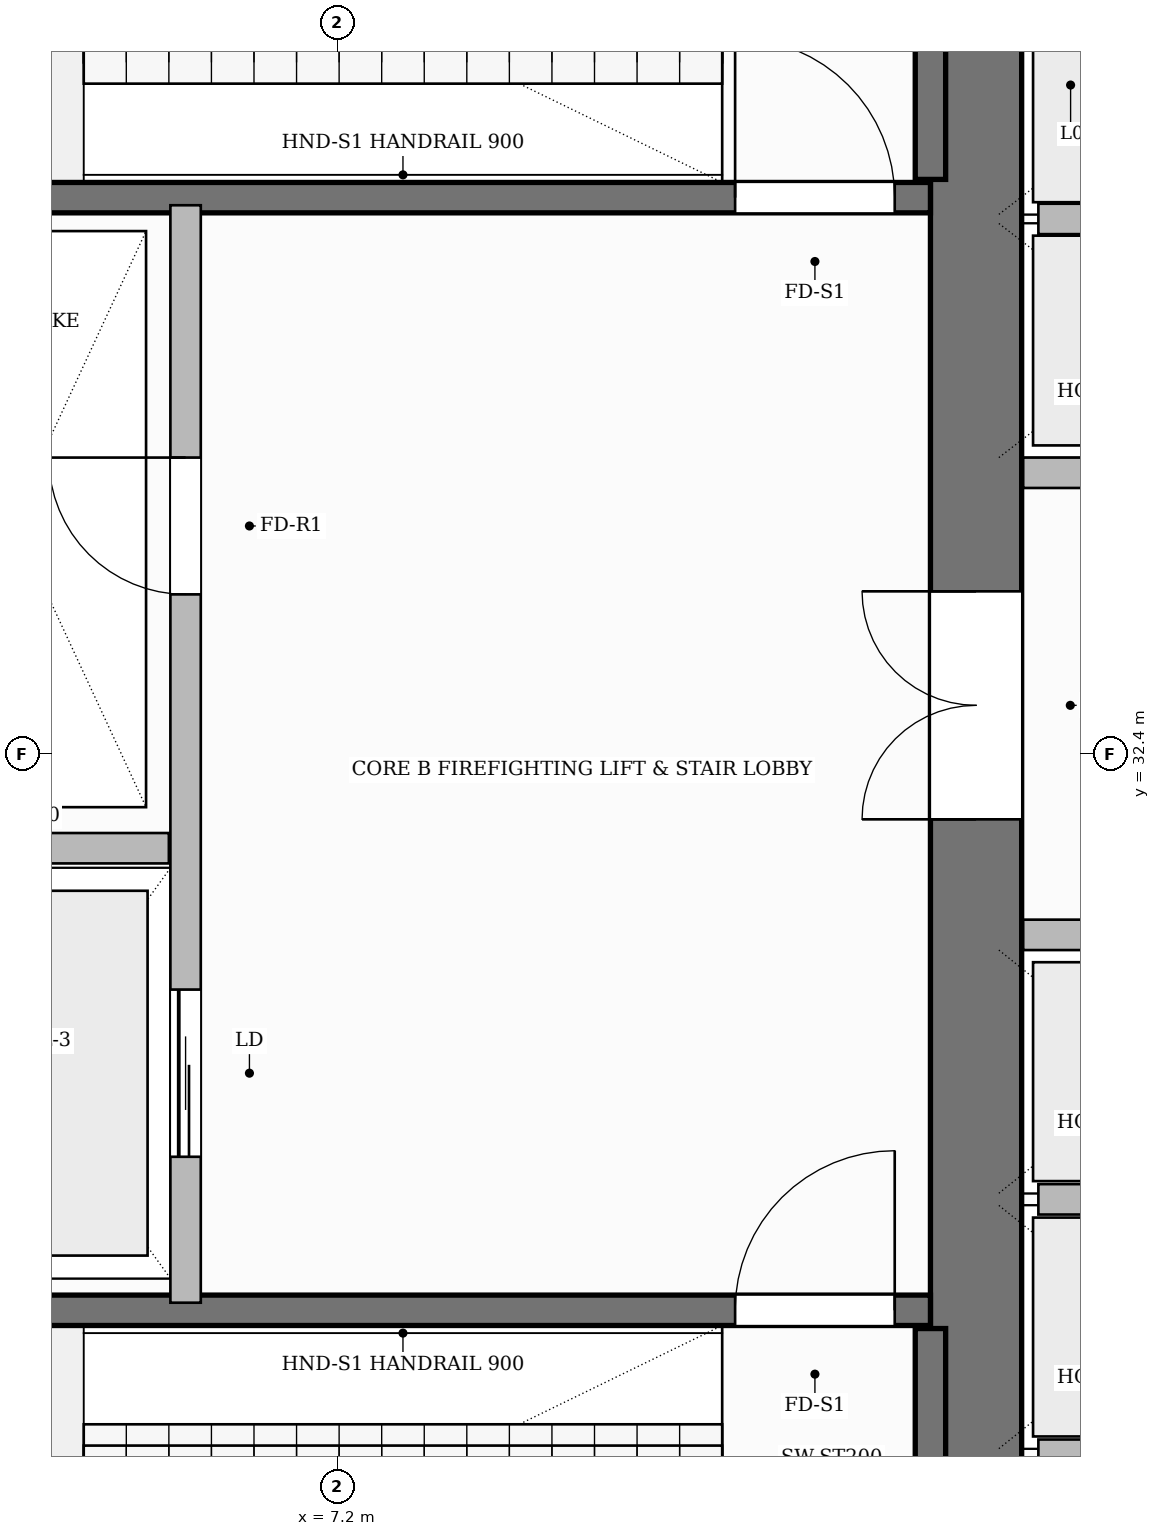
"""IFC4 building model, lengths in metres.
Left out: names, types, materials, properties, quantities, classifications, styles, units other than length and angle.
Written with IfcOpenShell. Run it as: python <this file> out.ifc"""

import sys

from ifc_helpers import new_model, si_unit, direction, frame, frame_2d, origin, place, context, subcontext, project, spatial, rectangle, extrude, source, transform, mapped, element, fill, save


model = new_model("IFC4")
c1 = context("Model", 3, precision=1e-05, world=origin(), true_north=direction((0.0, 1.0)))
c2 = subcontext(c1, "Body", "Model", "MODEL_VIEW")
j1 = project(units=[si_unit("LENGTHUNIT", "METRE"), si_unit("PLANEANGLEUNIT", "RADIAN")], contexts=[c1])
p1 = place(None, origin())
s1 = spatial("IfcSite", under=j1, at=p1, CompositionType="ELEMENT")
p2 = place(p1, origin())
s2 = spatial("IfcBuilding", under=s1, at=p2, CompositionType="ELEMENT")
p3 = place(p2, origin())
s3 = spatial("IfcBuildingStorey", under=s2, at=p3, CompositionType="ELEMENT", Elevation=0.0)
p4 = place(p3, frame((11.4, 25.5, 0.0), z_axis=(0.0, 0.0, 1.0), x_axis=(0.0, 1.0, 0.0)))
e1 = element("IfcWall", 1, at=p4, inside=s3, PredefinedType="SHEAR", context=c2, shape_type="SweptSolid", body=[
    extrude(rectangle(XDim=13.8, YDim=0.6, at=frame_2d((6.9, 0.0))), origin(), (0.0, 0.0, 1.0), 5.4),
])
p5 = place(p4, frame((6.47, 0.0, 0.0)))
e2 = element("IfcOpeningElement", 2, at=p5, cuts=e1, PredefinedType="OPENING", context=c2, shape_type="SweptSolid", body=[
    extrude(rectangle(XDim=1.5, YDim=2.2, at=frame_2d((0.75, 1.1))), frame((0.0, 0.31, 0.0), z_axis=(0.0, -1.0, 0.0), x_axis=(1.0, 0.0, 0.0)), (0.0, 0.0, 1.0), 0.62),
])
p6 = place(p3, frame((11.1, 25.92, 0.0), z_axis=(0.0, 0.0, 1.0), x_axis=(0.0, 1.0, 0.0)))
e3 = element("IfcWall", 3, at=p6, inside=s3, PredefinedType="SHEAR", context=c2, shape_type="SweptSolid", body=[
    extrude(rectangle(XDim=2.7, YDim=0.2, at=frame_2d((1.35, 0.0))), origin(), (0.0, 0.0, 1.0), 5.4),
])
p7 = place(p3, frame((4.0, 28.74, 0.0), z_axis=(0.0, 0.0, 1.0), x_axis=(1.0, 0.0, 0.0)))
e4 = element("IfcWall", 4, at=p7, inside=s3, PredefinedType="SHEAR", context=c2, shape_type="SweptSolid", body=[
    extrude(rectangle(XDim=7.1, YDim=0.2, at=frame_2d((3.55, 0.0))), origin(), (0.0, 0.0, 1.0), 5.4),
])
p8 = place(p7, frame((5.815, 0.0, 0.0)))
e5 = element("IfcOpeningElement", 5, at=p8, cuts=e4, PredefinedType="OPENING", context=c2, shape_type="SweptSolid", body=[
    extrude(rectangle(XDim=1.05, YDim=2.2, at=frame_2d((0.525, 1.1))), frame((0.0, 0.11, 0.0), z_axis=(0.0, -1.0, 0.0), x_axis=(1.0, 0.0, 0.0)), (0.0, 0.0, 1.0), 0.22),
])
p9 = place(p3, frame((11.1, 36.18, 0.0), z_axis=(0.0, 0.0, 1.0), x_axis=(0.0, 1.0, 0.0)))
e6 = element("IfcWall", 6, at=p9, inside=s3, PredefinedType="SHEAR", context=c2, shape_type="SweptSolid", body=[
    extrude(rectangle(XDim=2.7, YDim=0.2, at=frame_2d((1.35, 0.0))), origin(), (0.0, 0.0, 1.0), 5.4),
])
p10 = place(p3, frame((4.0, 36.06, 0.0), z_axis=(0.0, 0.0, 1.0), x_axis=(1.0, 0.0, 0.0)))
e7 = element("IfcWall", 7, at=p10, inside=s3, PredefinedType="SHEAR", context=c2, shape_type="SweptSolid", body=[
    extrude(rectangle(XDim=7.1, YDim=0.2, at=frame_2d((3.55, 0.0))), origin(), (0.0, 0.0, 1.0), 5.4),
])
p11 = place(p10, frame((5.815, 0.0, 0.0)))
e8 = element("IfcOpeningElement", 8, at=p11, cuts=e7, PredefinedType="OPENING", context=c2, shape_type="SweptSolid", body=[
    extrude(rectangle(XDim=1.05, YDim=2.2, at=frame_2d((0.525, 1.1))), frame((0.0, 0.11, 0.0), z_axis=(0.0, -1.0, 0.0), x_axis=(1.0, 0.0, 0.0)), (0.0, 0.0, 1.0), 0.22),
])
p12 = place(p3, frame((6.2, 28.79, 0.0), z_axis=(0.0, 0.0, 1.0), x_axis=(0.0, 1.0, 0.0)))
e9 = element("IfcWall", 9, at=p12, inside=s3, PredefinedType="PARTITIONING", context=c2, shape_type="SweptSolid", body=[
    extrude(rectangle(XDim=7.22, YDim=0.2, at=frame_2d((3.61, 0.0))), origin(), (0.0, 0.0, 1.0), 5.1),
])
p13 = place(p12, frame((4.66, 0.0, 0.0)))
e10 = element("IfcOpeningElement", 10, at=p13, cuts=e9, PredefinedType="OPENING", context=c2, shape_type="SweptSolid", body=[
    extrude(rectangle(XDim=0.9, YDim=2.1, at=frame_2d((0.45, 1.05))), frame((0.0, 0.11, 0.0), z_axis=(0.0, -1.0, 0.0), x_axis=(1.0, 0.0, 0.0)), (0.0, 0.0, 1.0), 0.22),
])
p14 = place(p12, frame((0.96, 0.0, 0.0)))
e11 = element("IfcOpeningElement", 11, at=p14, cuts=e9, PredefinedType="OPENING", context=c2, shape_type="SweptSolid", body=[
    extrude(rectangle(XDim=1.1, YDim=2.2, at=frame_2d((0.55, 1.1))), frame((0.0, 0.11, 0.0), z_axis=(0.0, -1.0, 0.0), x_axis=(1.0, 0.0, 0.0)), (0.0, 0.0, 1.0), 0.22),
])
p15 = place(p3, frame((3.96, 31.78, 0.0), z_axis=(0.0, 0.0, 1.0), x_axis=(1.0, 0.0, 0.0)))
e12 = element("IfcWall", 12, at=p15, inside=s3, PredefinedType="PARTITIONING", context=c2, shape_type="SweptSolid", body=[
    extrude(rectangle(XDim=2.13, YDim=0.2, at=frame_2d((1.065, 0.0))), origin(), (0.0, 0.0, 1.0), 5.1),
])
p16 = place(p3, frame((11.71, 31.21, 0.0), z_axis=(0.0, 0.0, 1.0), x_axis=(1.0, 0.0, 0.0)))
e13 = element("IfcWall", 13, at=p16, inside=s3, PredefinedType="PARTITIONING", context=c2, shape_type="SweptSolid", body=[
    extrude(rectangle(XDim=1.96, YDim=0.2, at=frame_2d((0.98, 0.0))), origin(), (0.0, 0.0, 1.0), 5.1),
])
for number, where, z_axis, x_axis in (
    (14, (11.81, 27.79, 0.0), (0.0, 0.0, 1.0), (1.0, 0.0, 0.0)),
    (15, (11.81, 29.47, 0.0), (0.0, 0.0, 1.0), (1.0, 0.0, 0.0)),
):
    element("IfcWall", number, at=place(p3, frame(where, z_axis=z_axis, x_axis=x_axis)), inside=s3, PredefinedType="PARTITIONING", context=c2, shape_type="SweptSolid", body=[
        extrude(rectangle(XDim=1.76, YDim=0.2, at=frame_2d((0.88, 0.0))), origin(), (0.0, 0.0, 1.0), 5.1),
    ])
p17 = place(p3, frame((11.71, 34.25, 0.0), z_axis=(0.0, 0.0, 1.0), x_axis=(1.0, 0.0, 0.0)))
e16 = element("IfcWall", 16, at=p17, inside=s3, PredefinedType="PARTITIONING", context=c2, shape_type="SweptSolid", body=[
    extrude(rectangle(XDim=1.96, YDim=0.2, at=frame_2d((0.98, 0.0))), origin(), (0.0, 0.0, 1.0), 5.1),
])
p18 = place(p3, frame((11.81, 35.92, 0.0), z_axis=(0.0, 0.0, 1.0), x_axis=(1.0, 0.0, 0.0)))
e17 = element("IfcWall", 17, at=p18, inside=s3, PredefinedType="PARTITIONING", context=c2, shape_type="SweptSolid", body=[
    extrude(rectangle(XDim=1.76, YDim=0.2, at=frame_2d((0.88, 0.0))), origin(), (0.0, 0.0, 1.0), 5.1),
])
m1 = source(origin(), c2, "Body", "SweptSolid", [
    extrude(rectangle(XDim=1.05, YDim=2.2, at=frame_2d((0.525, 1.1))), frame((0.0, 0.025, 0.0), z_axis=(0.0, -1.0, 0.0), x_axis=(1.0, 0.0, 0.0)), (0.0, 0.0, 1.0), 0.05),
])
p19 = place(p8, origin())
e18 = element("IfcDoor", 18, at=p19, inside=s3, OperationType="SINGLE_SWING_RIGHT", PredefinedType="DOOR", context=c2, shape_type="MappedRepresentation", body=[
    mapped(m1, transform((0.0, 0.0, 0.0), scale=1.0)),
])
fill(e5, e18)
p20 = place(p11, origin())
e19 = element("IfcDoor", 19, at=p20, inside=s3, OperationType="SINGLE_SWING_LEFT", PredefinedType="DOOR", context=c2, shape_type="MappedRepresentation", body=[
    mapped(m1, transform((0.0, 0.0, 0.0), scale=1.0)),
])
fill(e8, e19)
m2 = source(origin(), c2, "Body", "SweptSolid", [
    extrude(rectangle(XDim=0.9, YDim=2.1, at=frame_2d((0.45, 1.05))), frame((0.0, 0.025, 0.0), z_axis=(0.0, -1.0, 0.0), x_axis=(1.0, 0.0, 0.0)), (0.0, 0.0, 1.0), 0.05),
])
p21 = place(p13, origin())
e20 = element("IfcDoor", 20, at=p21, inside=s3, OperationType="SINGLE_SWING_RIGHT", PredefinedType="DOOR", context=c2, shape_type="MappedRepresentation", body=[
    mapped(m2, transform((0.0, 0.0, 0.0), scale=1.0)),
])
fill(e10, e20)
m3 = source(origin(), c2, "Body", "SweptSolid", [
    extrude(rectangle(XDim=1.5, YDim=2.2, at=frame_2d((0.75, 1.1))), frame((0.0, 0.025, 0.0), z_axis=(0.0, -1.0, 0.0), x_axis=(1.0, 0.0, 0.0)), (0.0, 0.0, 1.0), 0.05),
])
p22 = place(p5, origin())
e21 = element("IfcDoor", 21, at=p22, inside=s3, OperationType="DOUBLE_DOOR_SINGLE_SWING", PredefinedType="DOOR", context=c2, shape_type="MappedRepresentation", body=[
    mapped(m3, transform((0.0, 0.0, 0.0), scale=1.0)),
])
fill(e2, e21)
m4 = source(origin(), c2, "Body", "SweptSolid", [
    extrude(rectangle(XDim=1.1, YDim=2.2, at=frame_2d((0.55, 1.1))), frame((0.0, 0.025, 0.0), z_axis=(0.0, -1.0, 0.0), x_axis=(1.0, 0.0, 0.0)), (0.0, 0.0, 1.0), 0.05),
])
p23 = place(p14, origin())
e22 = element("IfcDoor", 22, at=p23, inside=s3, OperationType="SLIDING_TO_LEFT", PredefinedType="DOOR", context=c2, shape_type="MappedRepresentation", body=[
    mapped(m4, transform((0.0, 0.0, 0.0), scale=1.0)),
])
fill(e11, e22)
save(model, sys.argv[1])
